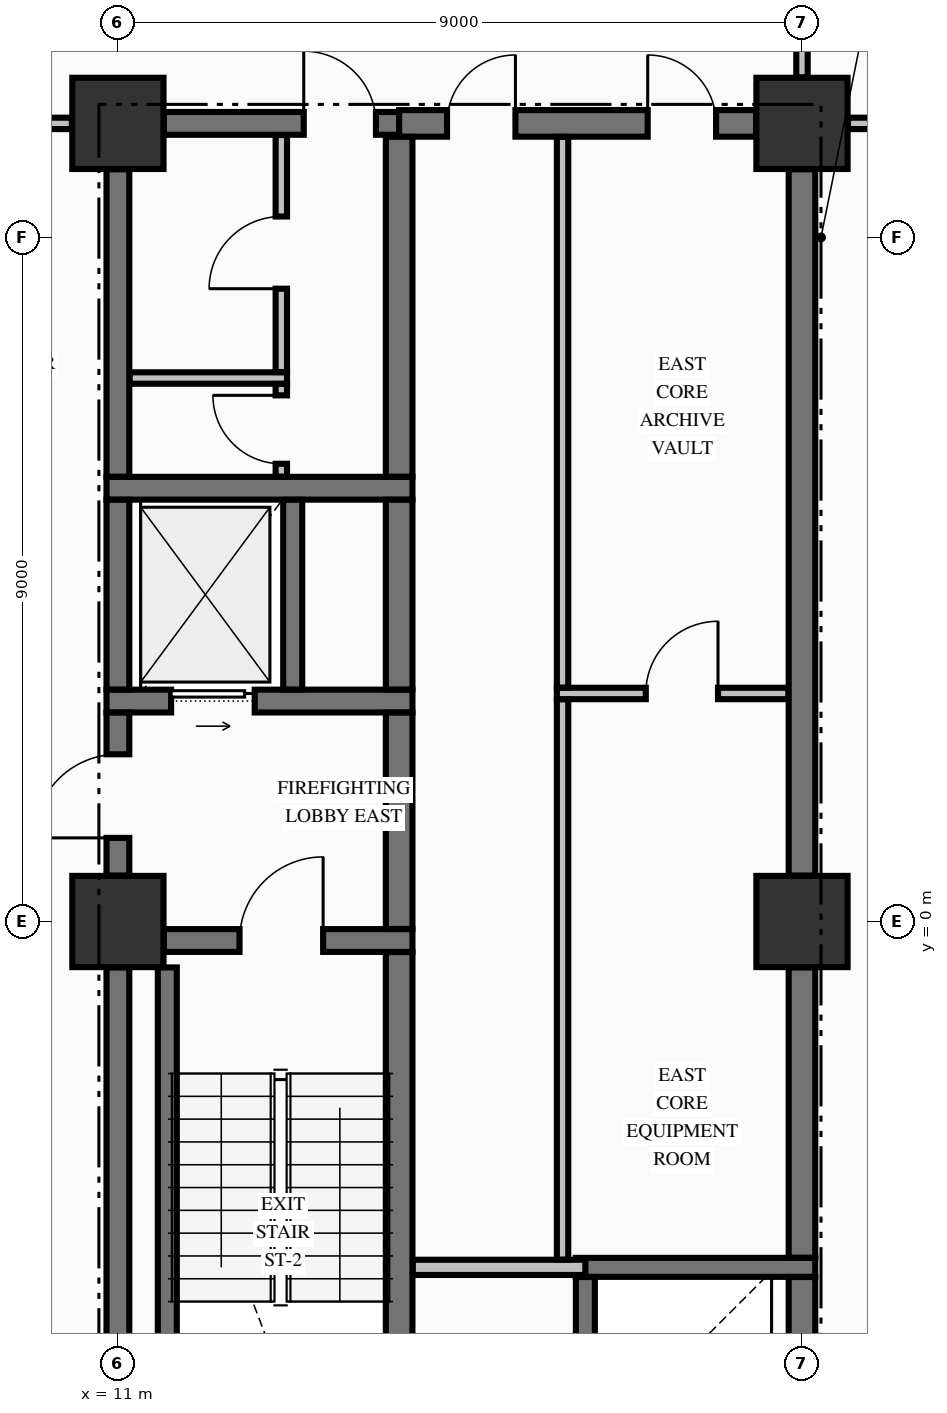
"""IFC4 building model, lengths in metres.
Left out: names, types, materials, properties, quantities, classifications, styles, units other than length and angle.
Written with IfcOpenShell. Run it as: python <this file> out.ifc"""

import sys

from ifc_helpers import new_model, si_unit, direction, frame, frame_2d, origin, origin_2d, place, context, subcontext, project, spatial, rectangle, extrude, element, fill, save


model = new_model("IFC4")
c1 = context("Model", 3, precision=1e-05, world=origin(), true_north=direction((0.0, 1.0)))
c2 = subcontext(c1, "Body", "Model", "MODEL_VIEW")
j1 = project(units=[si_unit("LENGTHUNIT", "METRE"), si_unit("PLANEANGLEUNIT", "RADIAN")], contexts=[c1])
p1 = place(None, origin())
s1 = spatial("IfcSite", under=j1, at=p1, CompositionType="ELEMENT")
p2 = place(p1, origin())
s2 = spatial("IfcBuilding", under=s1, at=p2, CompositionType="ELEMENT")
p3 = place(p2, frame((0.0, 0.0, 71.47)))
s3 = spatial("IfcBuildingStorey", under=s2, at=p3, CompositionType="ELEMENT", Elevation=71.47)
for number, where, z_axis, x_axis in (
    (1, (11.0, 0.0, -0.325), (0.0, 0.0, 1.0), (1.0, 0.0, 0.0)),
    (2, (11.0, 10.5, -0.325), (0.0, 0.0, 1.0), (1.0, 0.0, 0.0)),
    (3, (20.0, 10.5, -0.325), (0.0, 0.0, 1.0), (1.0, 0.0, 0.0)),
    (4, (20.0, 0.0, -0.325), (0.0, 0.0, 1.0), (1.0, 0.0, 0.0)),
):
    element("IfcColumn", number, at=place(p3, frame(where, z_axis=z_axis, x_axis=x_axis)), inside=s3, PredefinedType="COLUMN", context=c2, shape_type="SweptSolid", body=[
        extrude(rectangle(XDim=1.2, YDim=1.2, at=origin_2d()), origin(), (0.0, 0.0, 1.0), 3.645),
    ])
p4 = place(p3, frame((17.025, -4.55, 0.0), z_axis=(0.0, 0.0, 1.0), x_axis=(1.0, 0.0, 0.0)))
e5 = element("IfcWall", 5, at=p4, inside=s3, PredefinedType="SOLIDWALL", context=c2, shape_type="SweptSolid", body=[
    extrude(rectangle(XDim=3.15, YDim=0.25, at=frame_2d((1.575, 0.0))), origin(), (0.0, 0.0, 1.0), 3.32),
])
p5 = place(p3, frame((11.604, -0.25, 0.0), z_axis=(0.0, 0.0, 1.0), x_axis=(1.0, 0.0, 0.0)))
e6 = element("IfcWall", 6, at=p5, inside=s3, PredefinedType="SHEAR", context=c2, shape_type="SweptSolid", body=[
    extrude(rectangle(XDim=3.271, YDim=0.3, at=frame_2d((1.635, 0.0))), origin(), (0.0, 0.0, 1.0), 3.32),
])
p6 = place(p5, frame((0.996, 0.0, 0.0)))
e7 = element("IfcOpeningElement", 7, at=p6, cuts=e6, PredefinedType="OPENING", context=c2, shape_type="SweptSolid", body=[
    extrude(rectangle(XDim=1.1, YDim=2.15, at=frame_2d((0.55, 1.075))), frame((0.0, 0.16, 0.0), z_axis=(0.0, -1.0, 0.0), x_axis=(1.0, 0.0, 0.0)), (0.0, 0.0, 1.0), 0.32),
])
p7 = place(p3, frame((10.85, 2.9, 0.0), z_axis=(0.0, 0.0, 1.0), x_axis=(1.0, 0.0, 0.0)))
e8 = element("IfcWall", 8, at=p7, inside=s3, PredefinedType="SHEAR", context=c2, shape_type="SweptSolid", body=[
    extrude(rectangle(XDim=4.025, YDim=0.3, at=frame_2d((2.012, 0.0))), origin(), (0.0, 0.0, 1.0), 3.32),
])
p8 = place(p7, frame((0.85, 0.0, 0.0)))
e9 = element("IfcOpeningElement", 9, at=p8, cuts=e8, PredefinedType="OPENING", context=c2, shape_type="SweptSolid", body=[
    extrude(rectangle(XDim=1.1, YDim=2.2, at=frame_2d((0.55, 1.1))), frame((0.0, 0.16, 0.0), z_axis=(0.0, -1.0, 0.0), x_axis=(1.0, 0.0, 0.0)), (0.0, 0.0, 1.0), 0.32),
])
p9 = place(p3, frame((10.85, 5.7, 0.0), z_axis=(0.0, 0.0, 1.0), x_axis=(1.0, 0.0, 0.0)))
e10 = element("IfcWall", 10, at=p9, inside=s3, PredefinedType="SHEAR", context=c2, shape_type="SweptSolid", body=[
    extrude(rectangle(XDim=4.025, YDim=0.3, at=frame_2d((2.012, 0.0))), origin(), (0.0, 0.0, 1.0), 3.32),
])
p10 = place(p3, frame((11.604, 10.5, 0.0), z_axis=(0.0, 0.0, 1.0), x_axis=(1.0, 0.0, 0.0)))
e11 = element("IfcWall", 11, at=p10, inside=s3, PredefinedType="SHEAR", context=c2, shape_type="SweptSolid", body=[
    extrude(rectangle(XDim=3.096, YDim=0.3, at=frame_2d((1.548, 0.0))), origin(), (0.0, 0.0, 1.0), 3.32),
])
p11 = place(p10, frame((1.841, 0.0, 0.0)))
e12 = element("IfcOpeningElement", 12, at=p11, cuts=e11, PredefinedType="OPENING", context=c2, shape_type="SweptSolid", body=[
    extrude(rectangle(XDim=0.95, YDim=2.15, at=frame_2d((0.475, 1.075))), frame((0.0, 0.16, 0.0), z_axis=(0.0, -1.0, 0.0), x_axis=(1.0, 0.0, 0.0)), (0.0, 0.0, 1.0), 0.32),
])
p12 = place(p3, frame((14.7, 10.5, 0.0), z_axis=(0.0, 0.0, 1.0), x_axis=(1.0, 0.0, 0.0)))
e13 = element("IfcWall", 13, at=p12, inside=s3, PredefinedType="SHEAR", context=c2, shape_type="SweptSolid", body=[
    extrude(rectangle(XDim=4.696, YDim=0.35, at=frame_2d((2.348, 0.0))), origin(), (0.0, 0.0, 1.0), 3.32),
])
p13 = place(p12, frame((0.63, 0.0, 0.0)))
e14 = element("IfcOpeningElement", 14, at=p13, cuts=e13, PredefinedType="OPENING", context=c2, shape_type="SweptSolid", body=[
    extrude(rectangle(XDim=0.9, YDim=2.15, at=frame_2d((0.45, 1.075))), frame((0.0, 0.185, 0.0), z_axis=(0.0, -1.0, 0.0), x_axis=(1.0, 0.0, 0.0)), (0.0, 0.0, 1.0), 0.37),
])
p14 = place(p12, frame((3.27, 0.0, 0.0)))
e15 = element("IfcOpeningElement", 15, at=p14, cuts=e13, PredefinedType="OPENING", context=c2, shape_type="SweptSolid", body=[
    extrude(rectangle(XDim=0.9, YDim=2.15, at=frame_2d((0.45, 1.075))), frame((0.0, 0.185, 0.0), z_axis=(0.0, -1.0, 0.0), x_axis=(1.0, 0.0, 0.0)), (0.0, 0.0, 1.0), 0.37),
])
p15 = place(p3, frame((14.878, -4.55, 0.0), z_axis=(0.0, 0.0, 1.0), x_axis=(1.0, 0.0, 0.0)))
e16 = element("IfcWall", 16, at=p15, inside=s3, PredefinedType="PARTITIONING", context=c2, shape_type="SweptSolid", body=[
    extrude(rectangle(XDim=2.272, YDim=0.2, at=frame_2d((1.136, 0.0))), origin(), (0.0, 0.0, 1.0), 3.32),
])
p16 = place(p3, frame((16.775, 3.0, 0.0), z_axis=(0.0, 0.0, 1.0), x_axis=(1.0, 0.0, 0.0)))
e17 = element("IfcWall", 17, at=p16, inside=s3, PredefinedType="PARTITIONING", context=c2, shape_type="SweptSolid", body=[
    extrude(rectangle(XDim=3.047, YDim=0.15, at=frame_2d((1.523, 0.0))), origin(), (0.0, 0.0, 1.0), 3.32),
])
p17 = place(p16, frame((1.17, 0.0, 0.0)))
e18 = element("IfcOpeningElement", 18, at=p17, cuts=e17, PredefinedType="OPENING", context=c2, shape_type="SweptSolid", body=[
    extrude(rectangle(XDim=0.95, YDim=2.15, at=frame_2d((0.475, 1.075))), frame((0.0, 0.085, 0.0), z_axis=(0.0, -1.0, 0.0), x_axis=(1.0, 0.0, 0.0)), (0.0, 0.0, 1.0), 0.17),
])
p18 = place(p3, frame((11.153, 7.15, 0.0), z_axis=(0.0, 0.0, 1.0), x_axis=(1.0, 0.0, 0.0)))
e19 = element("IfcWall", 19, at=p18, inside=s3, PredefinedType="PARTITIONING", context=c2, shape_type="SweptSolid", body=[
    extrude(rectangle(XDim=2.072, YDim=0.15, at=frame_2d((1.036, 0.0))), origin(), (0.0, 0.0, 1.0), 3.32),
])
p19 = place(p3, frame((-10.394, 10.5, 0.0), z_axis=(0.0, 0.0, 1.0), x_axis=(1.0, 0.0, 0.0)))
e20 = element("IfcWall", 20, at=p19, inside=s3, PredefinedType="PARTITIONING", context=c2, shape_type="SweptSolid", body=[
    extrude(rectangle(XDim=20.788, YDim=0.15, at=frame_2d((10.394, 0.0))), origin(), (0.0, 0.0, 1.0), 3.32),
])
p20 = place(p19, frame((0.319, 0.0, 0.0)))
e21 = element("IfcOpeningElement", 21, at=p20, cuts=e20, PredefinedType="OPENING", context=c2, shape_type="SweptSolid", body=[
    extrude(rectangle(XDim=1.05, YDim=2.15, at=frame_2d((0.525, 1.075))), frame((0.0, 0.085, 0.0), z_axis=(0.0, -1.0, 0.0), x_axis=(1.0, 0.0, 0.0)), (0.0, 0.0, 1.0), 0.17),
])
p21 = place(p19, frame((19.419, 0.0, 0.0)))
e22 = element("IfcOpeningElement", 22, at=p21, cuts=e20, PredefinedType="OPENING", context=c2, shape_type="SweptSolid", body=[
    extrude(rectangle(XDim=1.05, YDim=2.15, at=frame_2d((0.525, 1.075))), frame((0.0, 0.085, 0.0), z_axis=(0.0, -1.0, 0.0), x_axis=(1.0, 0.0, 0.0)), (0.0, 0.0, 1.0), 0.17),
])
p22 = place(p3, frame((20.606, 10.5, 0.0), z_axis=(0.0, 0.0, 1.0), x_axis=(1.0, 0.0, 0.0)))
e23 = element("IfcWall", 23, at=p22, inside=s3, PredefinedType="PARTITIONING", context=c2, shape_type="SweptSolid", body=[
    extrude(rectangle(XDim=3.229, YDim=0.15, at=frame_2d((1.615, 0.0))), origin(), (0.0, 0.0, 1.0), 3.32),
])
p23 = place(p22, frame((0.894, 0.0, 0.0)))
e24 = element("IfcOpeningElement", 24, at=p23, cuts=e23, PredefinedType="OPENING", context=c2, shape_type="SweptSolid", body=[
    extrude(rectangle(XDim=1.0, YDim=2.15, at=frame_2d((0.5, 1.075))), frame((0.0, 0.085, 0.0), z_axis=(0.0, -1.0, 0.0), x_axis=(1.0, 0.0, 0.0)), (0.0, 0.0, 1.0), 0.17),
])
p24 = place(p3, frame((11.0, -9.346, 0.0), z_axis=(0.0, 0.0, 1.0), x_axis=(0.0, 1.0, 0.0)))
e25 = element("IfcWall", 25, at=p24, inside=s3, PredefinedType="SHEAR", context=c2, shape_type="SweptSolid", body=[
    extrude(rectangle(XDim=8.742, YDim=0.3, at=frame_2d((4.371, 0.0))), origin(), (0.0, 0.0, 1.0), 3.32),
])
p25 = place(p3, frame((11.0, 0.604, 0.0), z_axis=(0.0, 0.0, 1.0), x_axis=(0.0, 1.0, 0.0)))
e26 = element("IfcWall", 26, at=p25, inside=s3, PredefinedType="SHEAR", context=c2, shape_type="SweptSolid", body=[
    extrude(rectangle(XDim=2.144, YDim=0.3, at=frame_2d((1.072, 0.0))), origin(), (0.0, 0.0, 1.0), 3.32),
])
p26 = place(p25, frame((0.496, 0.0, 0.0)))
e27 = element("IfcOpeningElement", 27, at=p26, cuts=e26, PredefinedType="OPENING", context=c2, shape_type="SweptSolid", body=[
    extrude(rectangle(XDim=1.1, YDim=2.15, at=frame_2d((0.55, 1.075))), frame((0.0, 0.16, 0.0), z_axis=(0.0, -1.0, 0.0), x_axis=(1.0, 0.0, 0.0)), (0.0, 0.0, 1.0), 0.32),
])
p27 = place(p3, frame((11.0, 3.052, 0.0), z_axis=(0.0, 0.0, 1.0), x_axis=(0.0, 1.0, 0.0)))
e28 = element("IfcWall", 28, at=p27, inside=s3, PredefinedType="SHEAR", context=c2, shape_type="SweptSolid", body=[
    extrude(rectangle(XDim=2.496, YDim=0.3, at=frame_2d((1.248, 0.0))), origin(), (0.0, 0.0, 1.0), 3.32),
])
p28 = place(p3, frame((11.0, 5.852, 0.0), z_axis=(0.0, 0.0, 1.0), x_axis=(0.0, 1.0, 0.0)))
e29 = element("IfcWall", 29, at=p28, inside=s3, PredefinedType="SHEAR", context=c2, shape_type="SweptSolid", body=[
    extrude(rectangle(XDim=4.044, YDim=0.3, at=frame_2d((2.022, 0.0))), origin(), (0.0, 0.0, 1.0), 3.32),
])
p29 = place(p3, frame((11.65, -9.346, 0.0), z_axis=(0.0, 0.0, 1.0), x_axis=(0.0, 1.0, 0.0)))
e30 = element("IfcWall", 30, at=p29, inside=s3, PredefinedType="SOLIDWALL", context=c2, shape_type="SweptSolid", body=[
    extrude(rectangle(XDim=8.742, YDim=0.25, at=frame_2d((4.371, 0.0))), origin(), (0.0, 0.0, 1.0), 3.32),
])
p30 = place(p3, frame((13.3, 3.052, 0.0), z_axis=(0.0, 0.0, 1.0), x_axis=(0.0, 1.0, 0.0)))
e31 = element("IfcWall", 31, at=p30, inside=s3, PredefinedType="SOLIDWALL", context=c2, shape_type="SweptSolid", body=[
    extrude(rectangle(XDim=2.496, YDim=0.25, at=frame_2d((1.248, 0.0))), origin(), (0.0, 0.0, 1.0), 3.32),
])
p31 = place(p3, frame((14.7, -9.773, 0.0), z_axis=(0.0, 0.0, 1.0), x_axis=(0.0, 1.0, 0.0)))
e32 = element("IfcWall", 32, at=p31, inside=s3, PredefinedType="SHEAR", context=c2, shape_type="SweptSolid", body=[
    extrude(rectangle(XDim=9.371, YDim=0.35, at=frame_2d((4.686, 0.0))), origin(), (0.0, 0.0, 1.0), 3.32),
])
p32 = place(p3, frame((14.7, -0.098, 0.0), z_axis=(0.0, 0.0, 1.0), x_axis=(0.0, 1.0, 0.0)))
e33 = element("IfcWall", 33, at=p32, inside=s3, PredefinedType="SHEAR", context=c2, shape_type="SweptSolid", body=[
    extrude(rectangle(XDim=2.846, YDim=0.35, at=frame_2d((1.423, 0.0))), origin(), (0.0, 0.0, 1.0), 3.32),
])
p33 = place(p3, frame((14.7, 3.052, 0.0), z_axis=(0.0, 0.0, 1.0), x_axis=(0.0, 1.0, 0.0)))
e34 = element("IfcWall", 34, at=p33, inside=s3, PredefinedType="SHEAR", context=c2, shape_type="SweptSolid", body=[
    extrude(rectangle(XDim=2.496, YDim=0.35, at=frame_2d((1.248, 0.0))), origin(), (0.0, 0.0, 1.0), 3.32),
])
p34 = place(p3, frame((14.7, 5.852, 0.0), z_axis=(0.0, 0.0, 1.0), x_axis=(0.0, 1.0, 0.0)))
e35 = element("IfcWall", 35, at=p34, inside=s3, PredefinedType="SHEAR", context=c2, shape_type="SweptSolid", body=[
    extrude(rectangle(XDim=4.471, YDim=0.35, at=frame_2d((2.235, 0.0))), origin(), (0.0, 0.0, 1.0), 3.32),
])
p35 = place(p3, frame((17.15, -6.923, 0.0), z_axis=(0.0, 0.0, 1.0), x_axis=(0.0, 1.0, 0.0)))
e36 = element("IfcWall", 36, at=p35, inside=s3, PredefinedType="SOLIDWALL", context=c2, shape_type="SweptSolid", body=[
    extrude(rectangle(XDim=2.246, YDim=0.25, at=frame_2d((1.123, 0.0))), origin(), (0.0, 0.0, 1.0), 3.32),
])
p36 = place(p3, frame((20.0, -6.923, 0.0), z_axis=(0.0, 0.0, 1.0), x_axis=(0.0, 1.0, 0.0)))
e37 = element("IfcWall", 37, at=p36, inside=s3, PredefinedType="SHEAR", context=c2, shape_type="SweptSolid", body=[
    extrude(rectangle(XDim=2.246, YDim=0.35, at=frame_2d((1.123, 0.0))), origin(), (0.0, 0.0, 1.0), 3.32),
])
p37 = place(p3, frame((20.0, -4.423, 0.0), z_axis=(0.0, 0.0, 1.0), x_axis=(0.0, 1.0, 0.0)))
e38 = element("IfcWall", 38, at=p37, inside=s3, PredefinedType="SHEAR", context=c2, shape_type="SweptSolid", body=[
    extrude(rectangle(XDim=3.819, YDim=0.35, at=frame_2d((1.91, 0.0))), origin(), (0.0, 0.0, 1.0), 3.32),
])
p38 = place(p3, frame((20.0, 0.604, 0.0), z_axis=(0.0, 0.0, 1.0), x_axis=(0.0, 1.0, 0.0)))
e39 = element("IfcWall", 39, at=p38, inside=s3, PredefinedType="SHEAR", context=c2, shape_type="SweptSolid", body=[
    extrude(rectangle(XDim=9.292, YDim=0.35, at=frame_2d((4.646, 0.0))), origin(), (0.0, 0.0, 1.0), 3.32),
])
p39 = place(p3, frame((13.15, 5.853, 0.0), z_axis=(0.0, 0.0, 1.0), x_axis=(0.0, 1.0, 0.0)))
e40 = element("IfcWall", 40, at=p39, inside=s3, PredefinedType="PARTITIONING", context=c2, shape_type="SweptSolid", body=[
    extrude(rectangle(XDim=1.219, YDim=0.15, at=frame_2d((0.609, 0.0))), origin(), (0.0, 0.0, 1.0), 3.32),
])
p40 = place(p39, frame((0.169, 0.0, 0.0)))
e41 = element("IfcOpeningElement", 41, at=p40, cuts=e40, PredefinedType="OPENING", context=c2, shape_type="SweptSolid", body=[
    extrude(rectangle(XDim=0.9, YDim=2.15, at=frame_2d((0.45, 1.075))), frame((0.0, 0.085, 0.0), z_axis=(0.0, -1.0, 0.0), x_axis=(1.0, 0.0, 0.0)), (0.0, 0.0, 1.0), 0.17),
])
p41 = place(p3, frame((13.15, 7.228, 0.0), z_axis=(0.0, 0.0, 1.0), x_axis=(0.0, 1.0, 0.0)))
e42 = element("IfcWall", 42, at=p41, inside=s3, PredefinedType="PARTITIONING", context=c2, shape_type="SweptSolid", body=[
    extrude(rectangle(XDim=3.119, YDim=0.15, at=frame_2d((1.56, 0.0))), origin(), (0.0, 0.0, 1.0), 3.32),
])
p42 = place(p41, frame((1.097, 0.0, 0.0)))
e43 = element("IfcOpeningElement", 43, at=p42, cuts=e42, PredefinedType="OPENING", context=c2, shape_type="SweptSolid", body=[
    extrude(rectangle(XDim=0.95, YDim=2.15, at=frame_2d((0.475, 1.075))), frame((0.0, 0.085, 0.0), z_axis=(0.0, -1.0, 0.0), x_axis=(1.0, 0.0, 0.0)), (0.0, 0.0, 1.0), 0.17),
])
p43 = place(p3, frame((16.85, -4.447, 0.0), z_axis=(0.0, 0.0, 1.0), x_axis=(0.0, 1.0, 0.0)))
e44 = element("IfcWall", 44, at=p43, inside=s3, PredefinedType="PARTITIONING", context=c2, shape_type="SweptSolid", body=[
    extrude(rectangle(XDim=7.369, YDim=0.15, at=frame_2d((3.685, 0.0))), origin(), (0.0, 0.0, 1.0), 3.32),
])
p44 = place(p3, frame((16.85, 3.078, 0.0), z_axis=(0.0, 0.0, 1.0), x_axis=(0.0, 1.0, 0.0)))
e45 = element("IfcWall", 45, at=p44, inside=s3, PredefinedType="PARTITIONING", context=c2, shape_type="SweptSolid", body=[
    extrude(rectangle(XDim=7.244, YDim=0.15, at=frame_2d((3.622, 0.0))), origin(), (0.0, 0.0, 1.0), 3.32),
])
p45 = place(p3, frame((20.0, 11.106, 0.0), z_axis=(0.0, 0.0, 1.0), x_axis=(0.0, 1.0, 0.0)))
e46 = element("IfcWall", 46, at=p45, inside=s3, PredefinedType="PARTITIONING", context=c2, shape_type="SweptSolid", body=[
    extrude(rectangle(XDim=2.616, YDim=0.15, at=frame_2d((1.308, 0.0))), origin(), (0.0, 0.0, 1.0), 3.32),
])
p46 = place(p45, frame((0.569, 0.0, 0.0)))
e47 = element("IfcOpeningElement", 47, at=p46, cuts=e46, PredefinedType="OPENING", context=c2, shape_type="SweptSolid", body=[
    extrude(rectangle(XDim=0.95, YDim=2.15, at=frame_2d((0.475, 1.075))), frame((0.0, 0.085, 0.0), z_axis=(0.0, -1.0, 0.0), x_axis=(1.0, 0.0, 0.0)), (0.0, 0.0, 1.0), 0.17),
])
p47 = place(p6, origin())
e48 = element("IfcDoor", 48, at=p47, inside=s3, OperationType="SINGLE_SWING_RIGHT", PredefinedType="DOOR", context=c2, shape_type="SweptSolid", body=[
    extrude(rectangle(XDim=1.1, YDim=2.15, at=frame_2d((0.55, 1.075))), frame((0.0, 0.025, 0.0), z_axis=(0.0, -1.0, 0.0), x_axis=(1.0, 0.0, 0.0)), (0.0, 0.0, 1.0), 0.05),
])
fill(e7, e48)
p48 = place(p26, origin())
e49 = element("IfcDoor", 49, at=p48, inside=s3, OperationType="SINGLE_SWING_LEFT", PredefinedType="DOOR", context=c2, shape_type="SweptSolid", body=[
    extrude(rectangle(XDim=1.1, YDim=2.15, at=frame_2d((0.55, 1.075))), frame((0.0, 0.025, 0.0), z_axis=(0.0, -1.0, 0.0), x_axis=(1.0, 0.0, 0.0)), (0.0, 0.0, 1.0), 0.05),
])
fill(e27, e49)
p49 = place(p8, origin())
e50 = element("IfcDoor", 50, at=p49, inside=s3, OperationType="SLIDING_TO_RIGHT", PredefinedType="DOOR", context=c2, shape_type="SweptSolid", body=[
    extrude(rectangle(XDim=1.1, YDim=2.2, at=frame_2d((0.55, 1.1))), frame((0.0, 0.025, 0.0), z_axis=(0.0, -1.0, 0.0), x_axis=(1.0, 0.0, 0.0)), (0.0, 0.0, 1.0), 0.05),
])
fill(e9, e50)
p50 = place(p11, origin())
e51 = element("IfcDoor", 51, at=p50, inside=s3, OperationType="SINGLE_SWING_LEFT", PredefinedType="DOOR", context=c2, shape_type="SweptSolid", body=[
    extrude(rectangle(XDim=0.95, YDim=2.15, at=frame_2d((0.475, 1.075))), frame((0.0, 0.025, 0.0), z_axis=(0.0, -1.0, 0.0), x_axis=(1.0, 0.0, 0.0)), (0.0, 0.0, 1.0), 0.05),
])
fill(e12, e51)
p51 = place(p40, origin())
e52 = element("IfcDoor", 52, at=p51, inside=s3, OperationType="SINGLE_SWING_RIGHT", PredefinedType="DOOR", context=c2, shape_type="SweptSolid", body=[
    extrude(rectangle(XDim=0.9, YDim=2.15, at=frame_2d((0.45, 1.075))), frame((0.0, 0.025, 0.0), z_axis=(0.0, -1.0, 0.0), x_axis=(1.0, 0.0, 0.0)), (0.0, 0.0, 1.0), 0.05),
])
fill(e41, e52)
p52 = place(p42, origin())
e53 = element("IfcDoor", 53, at=p52, inside=s3, OperationType="SINGLE_SWING_LEFT", PredefinedType="DOOR", context=c2, shape_type="SweptSolid", body=[
    extrude(rectangle(XDim=0.95, YDim=2.15, at=frame_2d((0.475, 1.075))), frame((0.0, 0.025, 0.0), z_axis=(0.0, -1.0, 0.0), x_axis=(1.0, 0.0, 0.0)), (0.0, 0.0, 1.0), 0.05),
])
fill(e43, e53)
p53 = place(p13, origin())
e54 = element("IfcDoor", 54, at=p53, inside=s3, OperationType="SINGLE_SWING_RIGHT", PredefinedType="DOOR", context=c2, shape_type="SweptSolid", body=[
    extrude(rectangle(XDim=0.9, YDim=2.15, at=frame_2d((0.45, 1.075))), frame((0.0, 0.025, 0.0), z_axis=(0.0, -1.0, 0.0), x_axis=(1.0, 0.0, 0.0)), (0.0, 0.0, 1.0), 0.05),
])
fill(e14, e54)
p54 = place(p14, origin())
e55 = element("IfcDoor", 55, at=p54, inside=s3, OperationType="SINGLE_SWING_LEFT", PredefinedType="DOOR", context=c2, shape_type="SweptSolid", body=[
    extrude(rectangle(XDim=0.9, YDim=2.15, at=frame_2d((0.45, 1.075))), frame((0.0, 0.025, 0.0), z_axis=(0.0, -1.0, 0.0), x_axis=(1.0, 0.0, 0.0)), (0.0, 0.0, 1.0), 0.05),
])
fill(e15, e55)
p55 = place(p17, origin())
e56 = element("IfcDoor", 56, at=p55, inside=s3, OperationType="SINGLE_SWING_RIGHT", PredefinedType="DOOR", context=c2, shape_type="SweptSolid", body=[
    extrude(rectangle(XDim=0.95, YDim=2.15, at=frame_2d((0.475, 1.075))), frame((0.0, 0.025, 0.0), z_axis=(0.0, -1.0, 0.0), x_axis=(1.0, 0.0, 0.0)), (0.0, 0.0, 1.0), 0.05),
])
fill(e18, e56)
save(model, sys.argv[1])
